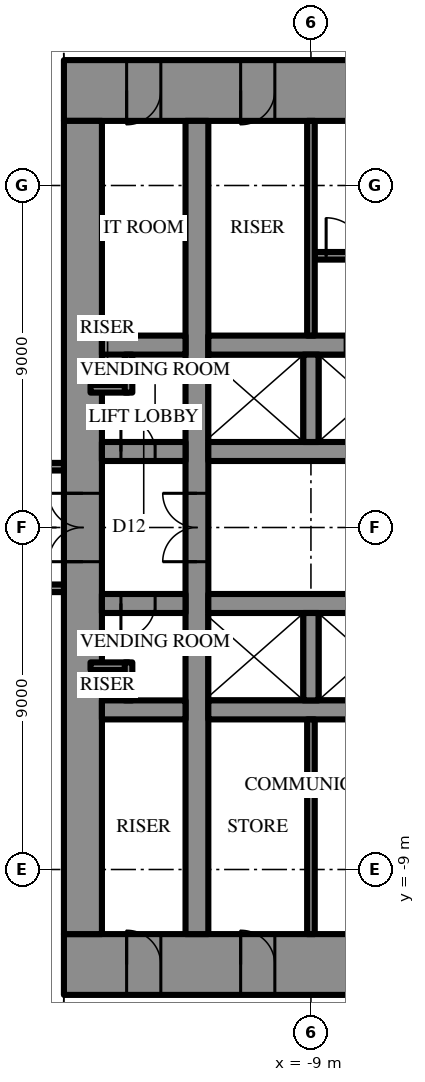
"""IFC4 building model, lengths in metres.
Left out: names, types, materials, properties, quantities, classifications, styles, units other than length and angle.
Written with IfcOpenShell. Run it as: python <this file> out.ifc"""

import sys

from ifc_helpers import new_model, si_unit, direction, frame, frame_2d, origin, place, context, subcontext, project, spatial, rectangle, extrude, element, fill, save


model = new_model("IFC4")
c1 = context("Model", 3, precision=1e-05, world=origin(), true_north=direction((0.0, 1.0)))
c2 = subcontext(c1, "Body", "Model", "MODEL_VIEW")
j1 = project(units=[si_unit("LENGTHUNIT", "METRE"), si_unit("PLANEANGLEUNIT", "RADIAN")], contexts=[c1])
p1 = place(None, origin())
s1 = spatial("IfcSite", under=j1, at=p1, CompositionType="ELEMENT")
p2 = place(p1, origin())
s2 = spatial("IfcBuilding", under=s1, at=p2, CompositionType="ELEMENT")
p3 = place(p2, frame((0.0, 0.0, 228.1)))
s3 = spatial("IfcBuildingStorey", under=s2, at=p3, CompositionType="ELEMENT", Elevation=228.1)
p4 = place(p3, frame((-15.5, 11.5, 0.0), z_axis=(0.0, 0.0, 1.0), x_axis=(1.0, 0.0, 0.0)))
e1 = element("IfcWall", 1, at=p4, inside=s3, PredefinedType="SHEAR", context=c2, shape_type="SweptSolid", body=[
    extrude(rectangle(XDim=31.0, YDim=1.6, at=frame_2d((15.5, 0.0))), origin(), (0.0, 0.0, 1.0), 4.2),
])
p5 = place(p4, frame((16.35, 0.0, 0.0)))
e2 = element("IfcOpeningElement", 2, at=p5, cuts=e1, PredefinedType="OPENING", context=c2, shape_type="SweptSolid", body=[
    extrude(rectangle(XDim=0.9, YDim=2.2, at=frame_2d((0.45, 1.1))), frame((0.0, 0.81, 0.0), z_axis=(0.0, -1.0, 0.0), x_axis=(1.0, 0.0, 0.0)), (0.0, 0.0, 1.0), 1.62),
])
p6 = place(p4, frame((19.35, 0.0, 0.0)))
e3 = element("IfcOpeningElement", 3, at=p6, cuts=e1, PredefinedType="OPENING", context=c2, shape_type="SweptSolid", body=[
    extrude(rectangle(XDim=0.9, YDim=2.2, at=frame_2d((0.45, 1.1))), frame((0.0, 0.81, 0.0), z_axis=(0.0, -1.0, 0.0), x_axis=(1.0, 0.0, 0.0)), (0.0, 0.0, 1.0), 1.62),
])
p7 = place(p4, frame((22.4, 0.0, 0.0)))
e4 = element("IfcOpeningElement", 4, at=p7, cuts=e1, PredefinedType="OPENING", context=c2, shape_type="SweptSolid", body=[
    extrude(rectangle(XDim=1.0, YDim=2.2, at=frame_2d((0.5, 1.1))), frame((0.0, 0.81, 0.0), z_axis=(0.0, -1.0, 0.0), x_axis=(1.0, 0.0, 0.0)), (0.0, 0.0, 1.0), 1.62),
])
p8 = place(p4, frame((1.65, 0.0, 0.0)))
e5 = element("IfcOpeningElement", 5, at=p8, cuts=e1, PredefinedType="OPENING", context=c2, shape_type="SweptSolid", body=[
    extrude(rectangle(XDim=0.9, YDim=2.2, at=frame_2d((0.45, 1.1))), frame((0.0, 0.81, 0.0), z_axis=(0.0, -1.0, 0.0), x_axis=(1.0, 0.0, 0.0)), (0.0, 0.0, 1.0), 1.62),
])
p9 = place(p4, frame((4.65, 0.0, 0.0)))
e6 = element("IfcOpeningElement", 6, at=p9, cuts=e1, PredefinedType="OPENING", context=c2, shape_type="SweptSolid", body=[
    extrude(rectangle(XDim=0.9, YDim=2.2, at=frame_2d((0.45, 1.1))), frame((0.0, 0.81, 0.0), z_axis=(0.0, -1.0, 0.0), x_axis=(1.0, 0.0, 0.0)), (0.0, 0.0, 1.0), 1.62),
])
p10 = place(p4, frame((25.45, 0.0, 0.0)))
e7 = element("IfcOpeningElement", 7, at=p10, cuts=e1, PredefinedType="OPENING", context=c2, shape_type="SweptSolid", body=[
    extrude(rectangle(XDim=0.9, YDim=2.2, at=frame_2d((0.45, 1.1))), frame((0.0, 0.81, 0.0), z_axis=(0.0, -1.0, 0.0), x_axis=(1.0, 0.0, 0.0)), (0.0, 0.0, 1.0), 1.62),
])
p11 = place(p4, frame((28.45, 0.0, 0.0)))
e8 = element("IfcOpeningElement", 8, at=p11, cuts=e1, PredefinedType="OPENING", context=c2, shape_type="SweptSolid", body=[
    extrude(rectangle(XDim=0.9, YDim=2.2, at=frame_2d((0.45, 1.1))), frame((0.0, 0.81, 0.0), z_axis=(0.0, -1.0, 0.0), x_axis=(1.0, 0.0, 0.0)), (0.0, 0.0, 1.0), 1.62),
])
p12 = place(p3, frame((15.5, -11.5, 0.0), z_axis=(0.0, 0.0, 1.0), x_axis=(-1.0, 0.0, 0.0)))
e9 = element("IfcWall", 9, at=p12, inside=s3, PredefinedType="SHEAR", context=c2, shape_type="SweptSolid", body=[
    extrude(rectangle(XDim=31.0, YDim=1.6, at=frame_2d((15.5, 0.0))), origin(), (0.0, 0.0, 1.0), 4.2),
])
p13 = place(p12, frame((16.35, 0.0, 0.0)))
e10 = element("IfcOpeningElement", 10, at=p13, cuts=e9, PredefinedType="OPENING", context=c2, shape_type="SweptSolid", body=[
    extrude(rectangle(XDim=0.9, YDim=2.2, at=frame_2d((0.45, 1.1))), frame((0.0, 0.81, 0.0), z_axis=(0.0, -1.0, 0.0), x_axis=(1.0, 0.0, 0.0)), (0.0, 0.0, 1.0), 1.62),
])
p14 = place(p12, frame((19.35, 0.0, 0.0)))
e11 = element("IfcOpeningElement", 11, at=p14, cuts=e9, PredefinedType="OPENING", context=c2, shape_type="SweptSolid", body=[
    extrude(rectangle(XDim=0.9, YDim=2.2, at=frame_2d((0.45, 1.1))), frame((0.0, 0.81, 0.0), z_axis=(0.0, -1.0, 0.0), x_axis=(1.0, 0.0, 0.0)), (0.0, 0.0, 1.0), 1.62),
])
p15 = place(p12, frame((22.4, 0.0, 0.0)))
e12 = element("IfcOpeningElement", 12, at=p15, cuts=e9, PredefinedType="OPENING", context=c2, shape_type="SweptSolid", body=[
    extrude(rectangle(XDim=1.0, YDim=2.2, at=frame_2d((0.5, 1.1))), frame((0.0, 0.81, 0.0), z_axis=(0.0, -1.0, 0.0), x_axis=(1.0, 0.0, 0.0)), (0.0, 0.0, 1.0), 1.62),
])
p16 = place(p12, frame((1.65, 0.0, 0.0)))
e13 = element("IfcOpeningElement", 13, at=p16, cuts=e9, PredefinedType="OPENING", context=c2, shape_type="SweptSolid", body=[
    extrude(rectangle(XDim=0.9, YDim=2.2, at=frame_2d((0.45, 1.1))), frame((0.0, 0.81, 0.0), z_axis=(0.0, -1.0, 0.0), x_axis=(1.0, 0.0, 0.0)), (0.0, 0.0, 1.0), 1.62),
])
p17 = place(p12, frame((4.65, 0.0, 0.0)))
e14 = element("IfcOpeningElement", 14, at=p17, cuts=e9, PredefinedType="OPENING", context=c2, shape_type="SweptSolid", body=[
    extrude(rectangle(XDim=0.9, YDim=2.2, at=frame_2d((0.45, 1.1))), frame((0.0, 0.81, 0.0), z_axis=(0.0, -1.0, 0.0), x_axis=(1.0, 0.0, 0.0)), (0.0, 0.0, 1.0), 1.62),
])
p18 = place(p12, frame((25.45, 0.0, 0.0)))
e15 = element("IfcOpeningElement", 15, at=p18, cuts=e9, PredefinedType="OPENING", context=c2, shape_type="SweptSolid", body=[
    extrude(rectangle(XDim=0.9, YDim=2.2, at=frame_2d((0.45, 1.1))), frame((0.0, 0.81, 0.0), z_axis=(0.0, -1.0, 0.0), x_axis=(1.0, 0.0, 0.0)), (0.0, 0.0, 1.0), 1.62),
])
p19 = place(p12, frame((28.45, 0.0, 0.0)))
e16 = element("IfcOpeningElement", 16, at=p19, cuts=e9, PredefinedType="OPENING", context=c2, shape_type="SweptSolid", body=[
    extrude(rectangle(XDim=0.9, YDim=2.2, at=frame_2d((0.45, 1.1))), frame((0.0, 0.81, 0.0), z_axis=(0.0, -1.0, 0.0), x_axis=(1.0, 0.0, 0.0)), (0.0, 0.0, 1.0), 1.62),
])
p20 = place(p3, frame((-15.0, 10.7, 0.0), z_axis=(0.0, 0.0, 1.0), x_axis=(0.0, -1.0, 0.0)))
e17 = element("IfcWall", 17, at=p20, inside=s3, PredefinedType="SHEAR", context=c2, shape_type="SweptSolid", body=[
    extrude(rectangle(XDim=21.4, YDim=1.0, at=frame_2d((10.7, 0.0))), origin(), (0.0, 0.0, 1.0), 4.2),
])
p21 = place(p20, frame((9.8, 0.0, 0.0)))
e18 = element("IfcOpeningElement", 18, at=p21, cuts=e17, PredefinedType="OPENING", context=c2, shape_type="SweptSolid", body=[
    extrude(rectangle(XDim=1.8, YDim=2.4, at=frame_2d((0.9, 1.2))), frame((0.0, 0.51, 0.0), z_axis=(0.0, -1.0, 0.0), x_axis=(1.0, 0.0, 0.0)), (0.0, 0.0, 1.0), 1.02),
])
p22 = place(p3, frame((-12.0, -10.7, 0.0), z_axis=(0.0, 0.0, 1.0), x_axis=(0.0, 1.0, 0.0)))
e19 = element("IfcWall", 19, at=p22, inside=s3, PredefinedType="SHEAR", context=c2, shape_type="SweptSolid", body=[
    extrude(rectangle(XDim=21.4, YDim=0.6, at=frame_2d((10.7, 0.0))), origin(), (0.0, 0.0, 1.0), 4.2),
])
p23 = place(p22, frame((9.8, 0.0, 0.0)))
e20 = element("IfcOpeningElement", 20, at=p23, cuts=e19, PredefinedType="OPENING", context=c2, shape_type="SweptSolid", body=[
    extrude(rectangle(XDim=1.8, YDim=2.4, at=frame_2d((0.9, 1.2))), frame((0.0, 0.31, 0.0), z_axis=(0.0, -1.0, 0.0), x_axis=(1.0, 0.0, 0.0)), (0.0, 0.0, 1.0), 0.62),
])
p24 = place(p3, frame((-14.5, 2.0, 0.0), z_axis=(0.0, 0.0, 1.0), x_axis=(1.0, 0.0, 0.0)))
e21 = element("IfcWall", 21, at=p24, inside=s3, PredefinedType="SHEAR", context=c2, shape_type="SweptSolid", body=[
    extrude(rectangle(XDim=2.2, YDim=0.5, at=frame_2d((1.1, 0.0))), origin(), (0.0, 0.0, 1.0), 4.2),
])
p25 = place(p24, frame((0.5, 0.0, 0.0)))
e22 = element("IfcOpeningElement", 22, at=p25, cuts=e21, PredefinedType="OPENING", context=c2, shape_type="SweptSolid", body=[
    extrude(rectangle(XDim=0.9, YDim=2.2, at=frame_2d((0.45, 1.1))), frame((0.0, 0.26, 0.0), z_axis=(0.0, -1.0, 0.0), x_axis=(1.0, 0.0, 0.0)), (0.0, 0.0, 1.0), 0.52),
])
p26 = place(p3, frame((-11.7, 2.0, 0.0), z_axis=(0.0, 0.0, 1.0), x_axis=(1.0, 0.0, 0.0)))
e23 = element("IfcWall", 23, at=p26, inside=s3, PredefinedType="SHEAR", context=c2, shape_type="SweptSolid", body=[
    extrude(rectangle(XDim=5.9, YDim=0.5, at=frame_2d((2.95, 0.0))), origin(), (0.0, 0.0, 1.0), 4.2),
])
p27 = place(p3, frame((-14.5, 4.8, 0.0), z_axis=(0.0, 0.0, 1.0), x_axis=(1.0, 0.0, 0.0)))
e24 = element("IfcWall", 24, at=p27, inside=s3, PredefinedType="SHEAR", context=c2, shape_type="SweptSolid", body=[
    extrude(rectangle(XDim=2.2, YDim=0.5, at=frame_2d((1.1, 0.0))), origin(), (0.0, 0.0, 1.0), 4.2),
])
p28 = place(p3, frame((-11.7, 4.8, 0.0), z_axis=(0.0, 0.0, 1.0), x_axis=(1.0, 0.0, 0.0)))
e25 = element("IfcWall", 25, at=p28, inside=s3, PredefinedType="SHEAR", context=c2, shape_type="SweptSolid", body=[
    extrude(rectangle(XDim=23.4, YDim=0.5, at=frame_2d((11.7, 0.0))), origin(), (0.0, 0.0, 1.0), 4.2),
])
p29 = place(p28, frame((6.6, 0.0, 0.0)))
e26 = element("IfcOpeningElement", 26, at=p29, cuts=e25, PredefinedType="OPENING", context=c2, shape_type="SweptSolid", body=[
    extrude(rectangle(XDim=1.2, YDim=2.2, at=frame_2d((0.6, 1.1))), frame((0.0, 0.26, 0.0), z_axis=(0.0, -1.0, 0.0), x_axis=(1.0, 0.0, 0.0)), (0.0, 0.0, 1.0), 0.52),
])
p30 = place(p28, frame((3.6, 0.0, 0.0)))
e27 = element("IfcOpeningElement", 27, at=p30, cuts=e25, PredefinedType="OPENING", context=c2, shape_type="SweptSolid", body=[
    extrude(rectangle(XDim=1.2, YDim=2.2, at=frame_2d((0.6, 1.1))), frame((0.0, 0.26, 0.0), z_axis=(0.0, -1.0, 0.0), x_axis=(1.0, 0.0, 0.0)), (0.0, 0.0, 1.0), 0.52),
])
p31 = place(p3, frame((-9.0, 2.25, 0.0), z_axis=(0.0, 0.0, 1.0), x_axis=(0.0, 1.0, 0.0)))
e28 = element("IfcWall", 28, at=p31, inside=s3, PredefinedType="SHEAR", context=c2, shape_type="SweptSolid", body=[
    extrude(rectangle(XDim=2.3, YDim=0.4, at=frame_2d((1.15, 0.0))), origin(), (0.0, 0.0, 1.0), 4.2),
])
p32 = place(p3, frame((-8.9, 7.15, 0.0), z_axis=(0.0, 0.0, 1.0), x_axis=(1.0, 0.0, 0.0)))
e29 = element("IfcWall", 29, at=p32, inside=s3, PredefinedType="SHEAR", context=c2, shape_type="SweptSolid", body=[
    extrude(rectangle(XDim=8.6, YDim=0.2, at=frame_2d((4.3, 0.0))), origin(), (0.0, 0.0, 1.0), 4.2),
])
p33 = place(p32, frame((0.3, 0.0, 0.0)))
e30 = element("IfcOpeningElement", 30, at=p33, cuts=e29, PredefinedType="OPENING", context=c2, shape_type="SweptSolid", body=[
    extrude(rectangle(XDim=1.0, YDim=2.2, at=frame_2d((0.5, 1.1))), frame((0.0, 0.11, 0.0), z_axis=(0.0, -1.0, 0.0), x_axis=(1.0, 0.0, 0.0)), (0.0, 0.0, 1.0), 0.22),
])
p34 = place(p3, frame((3.2, -2.0, 0.0), z_axis=(0.0, 0.0, 1.0), x_axis=(-1.0, 0.0, 0.0)))
e31 = element("IfcWall", 31, at=p34, inside=s3, PredefinedType="SHEAR", context=c2, shape_type="SweptSolid", body=[
    extrude(rectangle(XDim=14.9, YDim=0.5, at=frame_2d((7.45, 0.0))), origin(), (0.0, 0.0, 1.0), 4.2),
])
p35 = place(p34, frame((1.15, 0.0, 0.0)))
e32 = element("IfcOpeningElement", 32, at=p35, cuts=e31, PredefinedType="OPENING", context=c2, shape_type="SweptSolid", body=[
    extrude(rectangle(XDim=1.1, YDim=2.2, at=frame_2d((0.55, 1.1))), frame((0.0, 0.26, 0.0), z_axis=(0.0, -1.0, 0.0), x_axis=(1.0, 0.0, 0.0)), (0.0, 0.0, 1.0), 0.52),
])
p36 = place(p34, frame((4.15, 0.0, 0.0)))
e33 = element("IfcOpeningElement", 33, at=p36, cuts=e31, PredefinedType="OPENING", context=c2, shape_type="SweptSolid", body=[
    extrude(rectangle(XDim=1.1, YDim=2.2, at=frame_2d((0.55, 1.1))), frame((0.0, 0.26, 0.0), z_axis=(0.0, -1.0, 0.0), x_axis=(1.0, 0.0, 0.0)), (0.0, 0.0, 1.0), 0.52),
])
p37 = place(p34, frame((7.15, 0.0, 0.0)))
e34 = element("IfcOpeningElement", 34, at=p37, cuts=e31, PredefinedType="OPENING", context=c2, shape_type="SweptSolid", body=[
    extrude(rectangle(XDim=1.1, YDim=2.2, at=frame_2d((0.55, 1.1))), frame((0.0, 0.26, 0.0), z_axis=(0.0, -1.0, 0.0), x_axis=(1.0, 0.0, 0.0)), (0.0, 0.0, 1.0), 0.52),
])
p38 = place(p34, frame((10.15, 0.0, 0.0)))
e35 = element("IfcOpeningElement", 35, at=p38, cuts=e31, PredefinedType="OPENING", context=c2, shape_type="SweptSolid", body=[
    extrude(rectangle(XDim=1.1, YDim=2.2, at=frame_2d((0.55, 1.1))), frame((0.0, 0.26, 0.0), z_axis=(0.0, -1.0, 0.0), x_axis=(1.0, 0.0, 0.0)), (0.0, 0.0, 1.0), 0.52),
])
p39 = place(p3, frame((-12.3, -2.0, 0.0), z_axis=(0.0, 0.0, 1.0), x_axis=(-1.0, 0.0, 0.0)))
e36 = element("IfcWall", 36, at=p39, inside=s3, PredefinedType="SHEAR", context=c2, shape_type="SweptSolid", body=[
    extrude(rectangle(XDim=2.2, YDim=0.5, at=frame_2d((1.1, 0.0))), origin(), (0.0, 0.0, 1.0), 4.2),
])
p40 = place(p39, frame((0.8, 0.0, 0.0)))
e37 = element("IfcOpeningElement", 37, at=p40, cuts=e36, PredefinedType="OPENING", context=c2, shape_type="SweptSolid", body=[
    extrude(rectangle(XDim=0.9, YDim=2.2, at=frame_2d((0.45, 1.1))), frame((0.0, 0.26, 0.0), z_axis=(0.0, -1.0, 0.0), x_axis=(1.0, 0.0, 0.0)), (0.0, 0.0, 1.0), 0.52),
])
p41 = place(p3, frame((11.7, -4.8, 0.0), z_axis=(0.0, 0.0, 1.0), x_axis=(-1.0, 0.0, 0.0)))
e38 = element("IfcWall", 38, at=p41, inside=s3, PredefinedType="SHEAR", context=c2, shape_type="SweptSolid", body=[
    extrude(rectangle(XDim=23.4, YDim=0.5, at=frame_2d((11.7, 0.0))), origin(), (0.0, 0.0, 1.0), 4.2),
])
p42 = place(p41, frame((6.6, 0.0, 0.0)))
e39 = element("IfcOpeningElement", 39, at=p42, cuts=e38, PredefinedType="OPENING", context=c2, shape_type="SweptSolid", body=[
    extrude(rectangle(XDim=1.2, YDim=2.2, at=frame_2d((0.6, 1.1))), frame((0.0, 0.26, 0.0), z_axis=(0.0, -1.0, 0.0), x_axis=(1.0, 0.0, 0.0)), (0.0, 0.0, 1.0), 0.52),
])
p43 = place(p41, frame((3.6, 0.0, 0.0)))
e40 = element("IfcOpeningElement", 40, at=p43, cuts=e38, PredefinedType="OPENING", context=c2, shape_type="SweptSolid", body=[
    extrude(rectangle(XDim=1.2, YDim=2.2, at=frame_2d((0.6, 1.1))), frame((0.0, 0.26, 0.0), z_axis=(0.0, -1.0, 0.0), x_axis=(1.0, 0.0, 0.0)), (0.0, 0.0, 1.0), 0.52),
])
p44 = place(p3, frame((-12.3, -4.8, 0.0), z_axis=(0.0, 0.0, 1.0), x_axis=(-1.0, 0.0, 0.0)))
e41 = element("IfcWall", 41, at=p44, inside=s3, PredefinedType="SHEAR", context=c2, shape_type="SweptSolid", body=[
    extrude(rectangle(XDim=2.2, YDim=0.5, at=frame_2d((1.1, 0.0))), origin(), (0.0, 0.0, 1.0), 4.2),
])
p45 = place(p3, frame((-9.0, -2.25, 0.0), z_axis=(0.0, 0.0, 1.0), x_axis=(0.0, -1.0, 0.0)))
e42 = element("IfcWall", 42, at=p45, inside=s3, PredefinedType="SHEAR", context=c2, shape_type="SweptSolid", body=[
    extrude(rectangle(XDim=2.3, YDim=0.4, at=frame_2d((1.15, 0.0))), origin(), (0.0, 0.0, 1.0), 4.2),
])
for number, where, z_axis, x_axis in (
    (43, (-9.0, 5.05, 0.0), (0.0, 0.0, 1.0), (0.0, 1.0, 0.0)),
    (44, (-9.0, -5.05, 0.0), (0.0, 0.0, 1.0), (0.0, -1.0, 0.0)),
):
    element("IfcWall", number, at=place(p3, frame(where, z_axis=z_axis, x_axis=x_axis)), inside=s3, PredefinedType="PARTITIONING", context=c2, shape_type="SweptSolid", body=[
        extrude(rectangle(XDim=5.65, YDim=0.2, at=frame_2d((2.825, 0.0))), origin(), (0.0, 0.0, 1.0), 4.0),
    ])
for number, where, z_axis, x_axis in (
    (45, (-14.8, 3.65, 0.0), (0.0, 0.0, 1.0), (1.0, 0.0, 0.0)),
    (46, (-13.8, 3.55, 0.0), (0.0, 0.0, 1.0), (0.0, 1.0, 0.0)),
    (47, (-13.8, -3.65, 0.0), (0.0, 0.0, 1.0), (-1.0, 0.0, 0.0)),
    (48, (-13.8, -3.55, 0.0), (0.0, 0.0, 1.0), (0.0, -1.0, 0.0)),
):
    element("IfcWall", number, at=place(p3, frame(where, z_axis=z_axis, x_axis=x_axis)), inside=s3, PredefinedType="PARTITIONING", context=c2, shape_type="SweptSolid", body=[
        extrude(rectangle(XDim=1.0, YDim=0.2, at=frame_2d((0.5, 0.0))), origin(), (0.0, 0.0, 1.0), 4.0),
    ])
p46 = place(p3, frame((-15.5, 1.6, 0.0), z_axis=(0.0, 0.0, 1.0), x_axis=(-1.0, 0.0, 0.0)))
e49 = element("IfcWall", 49, at=p46, inside=s3, PredefinedType="PARTITIONING", context=c2, shape_type="SweptSolid", body=[
    extrude(rectangle(XDim=12.2, YDim=0.2, at=frame_2d((6.1, 0.0))), origin(), (0.0, 0.0, 1.0), 4.0),
])
p47 = place(p46, frame((3.16, 0.0, 0.0)))
e50 = element("IfcOpeningElement", 50, at=p47, cuts=e49, PredefinedType="OPENING", context=c2, shape_type="SweptSolid", body=[
    extrude(rectangle(XDim=1.0, YDim=2.2, at=frame_2d((0.5, 1.1))), frame((0.0, 0.11, 0.0), z_axis=(0.0, -1.0, 0.0), x_axis=(1.0, 0.0, 0.0)), (0.0, 0.0, 1.0), 0.22),
])
p48 = place(p3, frame((-15.5, -1.6, 0.0), z_axis=(0.0, 0.0, 1.0), x_axis=(-1.0, 0.0, 0.0)))
e51 = element("IfcWall", 51, at=p48, inside=s3, PredefinedType="PARTITIONING", context=c2, shape_type="SweptSolid", body=[
    extrude(rectangle(XDim=12.2, YDim=0.2, at=frame_2d((6.1, 0.0))), origin(), (0.0, 0.0, 1.0), 4.0),
])
p49 = place(p48, frame((3.16, 0.0, 0.0)))
e52 = element("IfcOpeningElement", 52, at=p49, cuts=e51, PredefinedType="OPENING", context=c2, shape_type="SweptSolid", body=[
    extrude(rectangle(XDim=1.0, YDim=2.2, at=frame_2d((0.5, 1.1))), frame((0.0, 0.11, 0.0), z_axis=(0.0, -1.0, 0.0), x_axis=(1.0, 0.0, 0.0)), (0.0, 0.0, 1.0), 0.22),
])
p50 = place(p21, frame((1.8, 0.0, 0.0), z_axis=(0.0, 0.0, 1.0), x_axis=(-1.0, 0.0, 0.0)))
e53 = element("IfcDoor", 53, at=p50, inside=s3, OperationType="DOUBLE_DOOR_SINGLE_SWING", PredefinedType="DOOR", context=c2, shape_type="SweptSolid", body=[
    extrude(rectangle(XDim=1.8, YDim=2.4, at=frame_2d((0.9, 1.2))), frame((0.0, 0.025, 0.0), z_axis=(0.0, -1.0, 0.0), x_axis=(1.0, 0.0, 0.0)), (0.0, 0.0, 1.0), 0.05),
])
fill(e18, e53)
p51 = place(p33, origin())
e54 = element("IfcDoor", 54, at=p51, inside=s3, OperationType="SINGLE_SWING_RIGHT", PredefinedType="DOOR", context=c2, shape_type="SweptSolid", body=[
    extrude(rectangle(XDim=1.0, YDim=2.2, at=frame_2d((0.5, 1.1))), frame((0.0, 0.025, 0.0), z_axis=(0.0, -1.0, 0.0), x_axis=(1.0, 0.0, 0.0)), (0.0, 0.0, 1.0), 0.05),
])
fill(e30, e54)
p52 = place(p8, frame((0.9, 0.0, 0.0), z_axis=(0.0, 0.0, 1.0), x_axis=(-1.0, 0.0, 0.0)))
e55 = element("IfcDoor", 55, at=p52, inside=s3, OperationType="SINGLE_SWING_LEFT", PredefinedType="DOOR", context=c2, shape_type="SweptSolid", body=[
    extrude(rectangle(XDim=0.9, YDim=2.2, at=frame_2d((0.45, 1.1))), frame((0.0, 0.025, 0.0), z_axis=(0.0, -1.0, 0.0), x_axis=(1.0, 0.0, 0.0)), (0.0, 0.0, 1.0), 0.05),
])
fill(e5, e55)
p53 = place(p9, frame((0.9, 0.0, 0.0), z_axis=(0.0, 0.0, 1.0), x_axis=(-1.0, 0.0, 0.0)))
e56 = element("IfcDoor", 56, at=p53, inside=s3, OperationType="SINGLE_SWING_LEFT", PredefinedType="DOOR", context=c2, shape_type="SweptSolid", body=[
    extrude(rectangle(XDim=0.9, YDim=2.2, at=frame_2d((0.45, 1.1))), frame((0.0, 0.025, 0.0), z_axis=(0.0, -1.0, 0.0), x_axis=(1.0, 0.0, 0.0)), (0.0, 0.0, 1.0), 0.05),
])
fill(e6, e56)
p54 = place(p18, frame((0.9, 0.0, 0.0), z_axis=(0.0, 0.0, 1.0), x_axis=(-1.0, 0.0, 0.0)))
e57 = element("IfcDoor", 57, at=p54, inside=s3, OperationType="SINGLE_SWING_RIGHT", PredefinedType="DOOR", context=c2, shape_type="SweptSolid", body=[
    extrude(rectangle(XDim=0.9, YDim=2.2, at=frame_2d((0.45, 1.1))), frame((0.0, 0.025, 0.0), z_axis=(0.0, -1.0, 0.0), x_axis=(1.0, 0.0, 0.0)), (0.0, 0.0, 1.0), 0.05),
])
fill(e15, e57)
p55 = place(p19, frame((0.9, 0.0, 0.0), z_axis=(0.0, 0.0, 1.0), x_axis=(-1.0, 0.0, 0.0)))
e58 = element("IfcDoor", 58, at=p55, inside=s3, OperationType="SINGLE_SWING_RIGHT", PredefinedType="DOOR", context=c2, shape_type="SweptSolid", body=[
    extrude(rectangle(XDim=0.9, YDim=2.2, at=frame_2d((0.45, 1.1))), frame((0.0, 0.025, 0.0), z_axis=(0.0, -1.0, 0.0), x_axis=(1.0, 0.0, 0.0)), (0.0, 0.0, 1.0), 0.05),
])
fill(e16, e58)
p56 = place(p25, origin())
e59 = element("IfcDoor", 59, at=p56, inside=s3, OperationType="SINGLE_SWING_RIGHT", PredefinedType="DOOR", context=c2, shape_type="SweptSolid", body=[
    extrude(rectangle(XDim=0.9, YDim=2.2, at=frame_2d((0.45, 1.1))), frame((0.0, 0.025, 0.0), z_axis=(0.0, -1.0, 0.0), x_axis=(1.0, 0.0, 0.0)), (0.0, 0.0, 1.0), 0.05),
])
fill(e22, e59)
p57 = place(p40, origin())
e60 = element("IfcDoor", 60, at=p57, inside=s3, OperationType="SINGLE_SWING_LEFT", PredefinedType="DOOR", context=c2, shape_type="SweptSolid", body=[
    extrude(rectangle(XDim=0.9, YDim=2.2, at=frame_2d((0.45, 1.1))), frame((0.0, 0.025, 0.0), z_axis=(0.0, -1.0, 0.0), x_axis=(1.0, 0.0, 0.0)), (0.0, 0.0, 1.0), 0.05),
])
fill(e37, e60)
p58 = place(p23, origin())
e61 = element("IfcDoor", 61, at=p58, inside=s3, OperationType="DOUBLE_DOOR_SINGLE_SWING", PredefinedType="DOOR", context=c2, shape_type="SweptSolid", body=[
    extrude(rectangle(XDim=1.8, YDim=2.4, at=frame_2d((0.9, 1.2))), frame((0.0, 0.025, 0.0), z_axis=(0.0, -1.0, 0.0), x_axis=(1.0, 0.0, 0.0)), (0.0, 0.0, 1.0), 0.05),
])
fill(e20, e61)
save(model, sys.argv[1])
